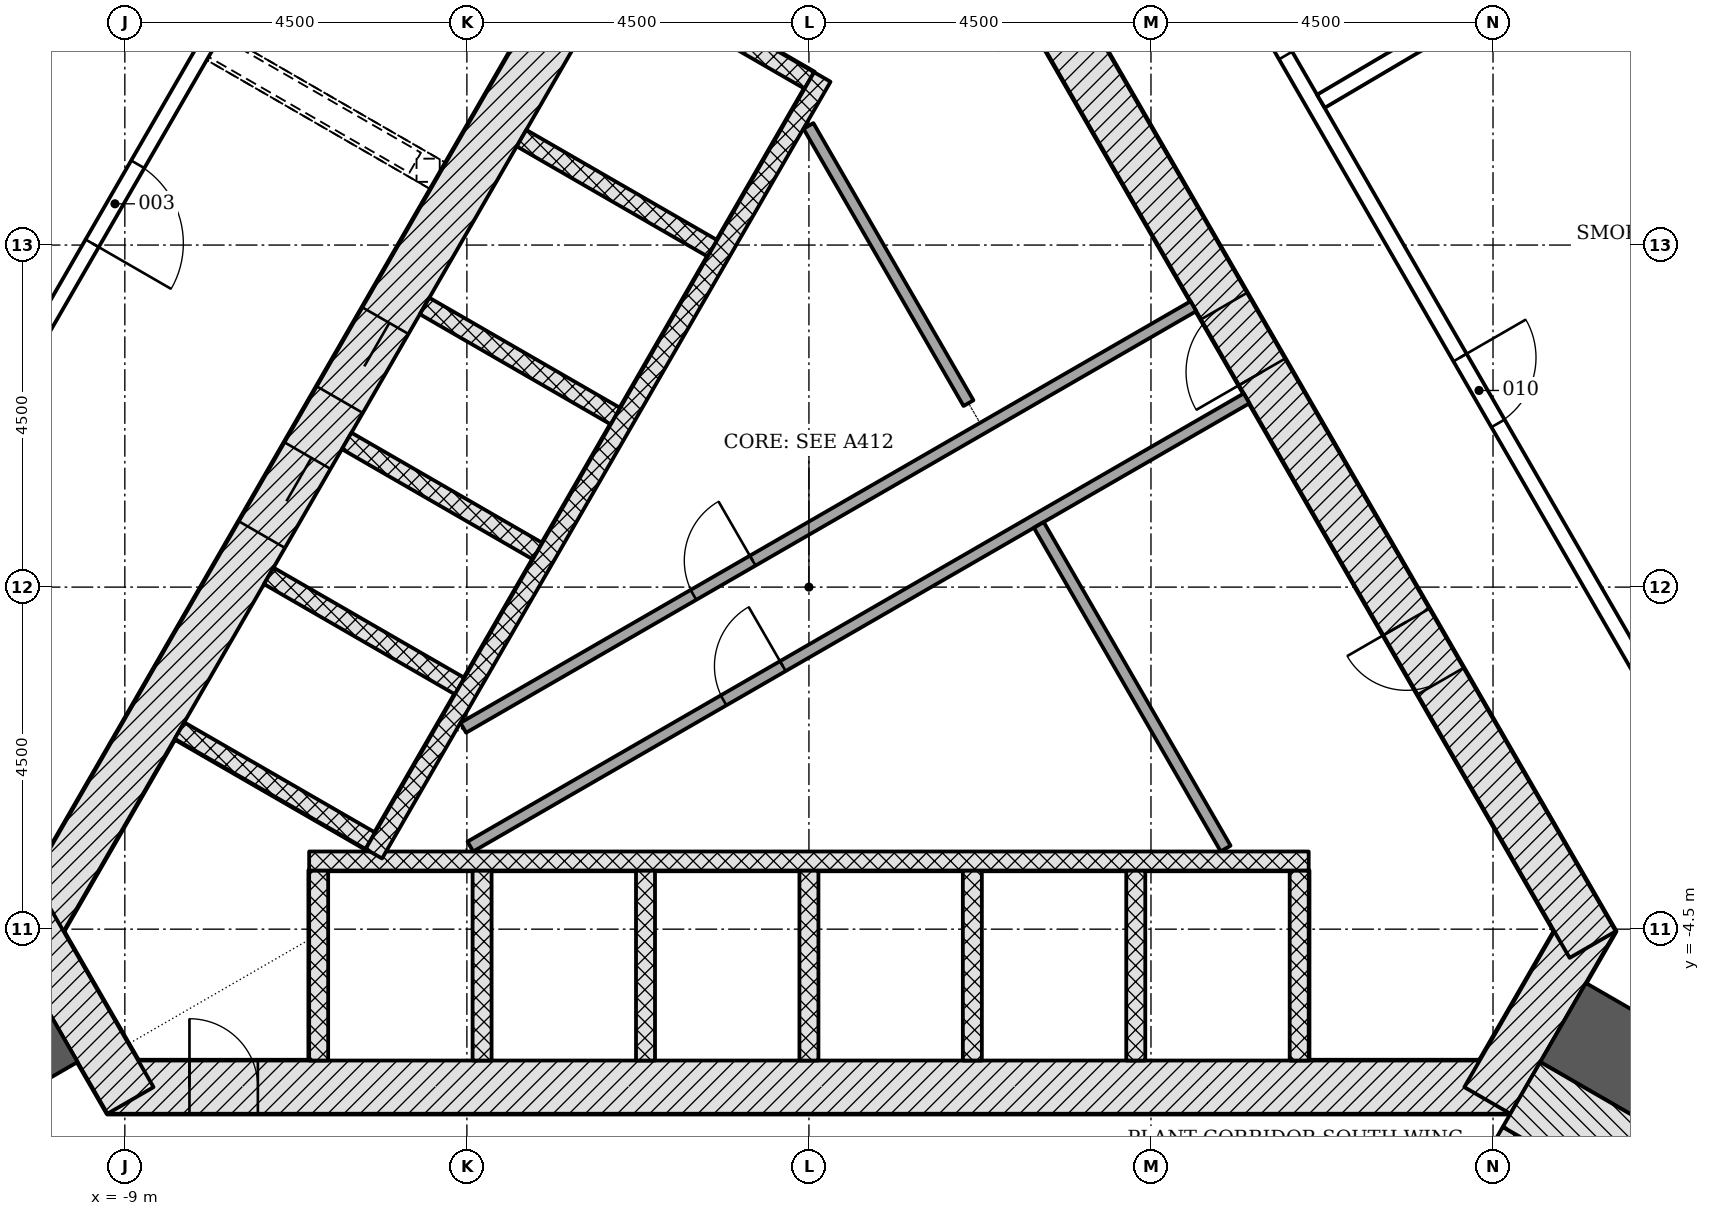
"""IFC4 building model, lengths in metres.
Left out: names, types, materials, properties, quantities, classifications, styles, units other than length and angle.
Written with IfcOpenShell. Run it as: python <this file> out.ifc"""

import sys

from ifc_helpers import new_model, si_unit, direction, frame, frame_2d, origin, place, context, subcontext, project, spatial, rectangle, extrude, element, fill, save


model = new_model("IFC4")
c1 = context("Model", 3, precision=1e-05, world=origin(), true_north=direction((0.0, 1.0)))
c2 = subcontext(c1, "Body", "Model", "MODEL_VIEW")
j1 = project(units=[si_unit("LENGTHUNIT", "METRE"), si_unit("PLANEANGLEUNIT", "RADIAN")], contexts=[c1])
p1 = place(None, origin())
s1 = spatial("IfcSite", under=j1, at=p1, CompositionType="ELEMENT")
p2 = place(p1, origin())
s2 = spatial("IfcBuilding", under=s1, at=p2, CompositionType="ELEMENT")
p3 = place(p2, frame((0.0, 0.0, 87.0)))
s3 = spatial("IfcBuildingStorey", under=s2, at=p3, CompositionType="ELEMENT", Elevation=87.0)
p4 = place(p3, frame((-9.229, -6.578, -0.3), z_axis=(0.0, 0.0, 1.0), x_axis=(1.0, 0.0, 0.0)))
e1 = element("IfcWall", 1, at=p4, inside=s3, PredefinedType="SHEAR", context=c2, shape_type="SweptSolid", body=[
    extrude(rectangle(XDim=18.458, YDim=0.7, at=frame_2d((9.229, 0.0))), origin(), (0.0, 0.0, 1.0), 4.6),
])
p5 = place(p4, frame((1.079, 0.0, 0.3)))
e2 = element("IfcOpeningElement", 2, at=p5, cuts=e1, PredefinedType="OPENING", context=c2, shape_type="SweptSolid", body=[
    extrude(rectangle(XDim=0.9, YDim=2.1, at=frame_2d((0.45, 1.05))), frame((0.0, 0.36, 0.0), z_axis=(0.0, -1.0, 0.0), x_axis=(1.0, 0.0, 0.0)), (0.0, 0.0, 1.0), 0.72),
])
p6 = place(p3, frame((8.926, -6.753, -0.3), z_axis=(0.0, 0.0, 1.0), x_axis=(0.500042739161, 0.866000726912, 0.0)))
e3 = element("IfcWall", 3, at=p6, inside=s3, PredefinedType="SHEAR", context=c2, shape_type="SweptSolid", body=[
    extrude(rectangle(XDim=2.771, YDim=0.7, at=frame_2d((1.386, 0.0))), origin(), (0.0, 0.0, 1.0), 4.6),
])
p7 = place(p3, frame((10.311, -4.703, -0.3), z_axis=(0.0, 0.0, 1.0), x_axis=(-0.500001446645, 0.866024568562, 0.0)))
e4 = element("IfcWall", 4, at=p7, inside=s3, PredefinedType="SHEAR", context=c2, shape_type="SweptSolid", body=[
    extrude(rectangle(XDim=18.458, YDim=0.7, at=frame_2d((9.229, 0.0))), origin(), (0.0, 0.0, 1.0), 4.6),
])
p8 = place(p7, frame((8.7, 0.0, 0.3)))
e5 = element("IfcOpeningElement", 5, at=p8, cuts=e4, PredefinedType="OPENING", context=c2, shape_type="SweptSolid", body=[
    extrude(rectangle(XDim=1.0, YDim=2.1, at=frame_2d((0.5, 1.05))), frame((0.0, 0.36, 0.0), z_axis=(0.0, -1.0, 0.0), x_axis=(1.0, 0.0, 0.0)), (0.0, 0.0, 1.0), 0.72),
])
p9 = place(p7, frame((4.002, 0.0, 0.3)))
e6 = element("IfcOpeningElement", 6, at=p9, cuts=e4, PredefinedType="OPENING", context=c2, shape_type="SweptSolid", body=[
    extrude(rectangle(XDim=0.9, YDim=2.1, at=frame_2d((0.45, 1.05))), frame((0.0, 0.36, 0.0), z_axis=(0.0, -1.0, 0.0), x_axis=(1.0, 0.0, 0.0)), (0.0, 0.0, 1.0), 0.72),
])
p10 = place(p7, frame((14.093, 0.0, 0.3)))
e7 = element("IfcOpeningElement", 7, at=p10, cuts=e4, PredefinedType="OPENING", context=c2, shape_type="SweptSolid", body=[
    extrude(rectangle(XDim=0.9, YDim=2.1, at=frame_2d((0.45, 1.05))), frame((0.0, 0.36, 0.0), z_axis=(0.0, -1.0, 0.0), x_axis=(1.0, 0.0, 0.0)), (0.0, 0.0, 1.0), 0.72),
])
p11 = place(p3, frame((-1.083, 11.281, -0.3), z_axis=(0.0, 0.0, 1.0), x_axis=(-0.500001446645, -0.866024568562, 0.0)))
e8 = element("IfcWall", 8, at=p11, inside=s3, PredefinedType="SHEAR", context=c2, shape_type="SweptSolid", body=[
    extrude(rectangle(XDim=18.458, YDim=0.7, at=frame_2d((9.229, 0.0))), origin(), (0.0, 0.0, 1.0), 4.6),
])
p12 = place(p11, frame((8.979, 0.0, 0.3)))
e9 = element("IfcOpeningElement", 9, at=p12, cuts=e8, PredefinedType="OPENING", context=c2, shape_type="SweptSolid", body=[
    extrude(rectangle(XDim=1.2, YDim=2.1, at=frame_2d((0.6, 1.05))), frame((0.0, 0.36, 0.0), z_axis=(0.0, -1.0, 0.0), x_axis=(1.0, 0.0, 0.0)), (0.0, 0.0, 1.0), 0.72),
])
p13 = place(p11, frame((11.029, 0.0, 0.3)))
e10 = element("IfcOpeningElement", 10, at=p13, cuts=e8, PredefinedType="OPENING", context=c2, shape_type="SweptSolid", body=[
    extrude(rectangle(XDim=1.2, YDim=2.1, at=frame_2d((0.6, 1.05))), frame((0.0, 0.36, 0.0), z_axis=(0.0, -1.0, 0.0), x_axis=(1.0, 0.0, 0.0)), (0.0, 0.0, 1.0), 0.72),
])
p14 = place(p3, frame((-10.311, -4.353, -0.3), z_axis=(0.0, 0.0, 1.0), x_axis=(0.500042739161, -0.866000726912, 0.0)))
e11 = element("IfcWall", 11, at=p14, inside=s3, PredefinedType="SHEAR", context=c2, shape_type="SweptSolid", body=[
    extrude(rectangle(XDim=2.771, YDim=0.7, at=frame_2d((1.386, 0.0))), origin(), (0.0, 0.0, 1.0), 4.6),
])
for number, where, z_axis, x_axis in (
    (12, (-9.922, -5.728, -0.3), (0.0, 0.0, 1.0), (-0.866, -0.5, 0.0)),
    (13, (9.922, -5.728, -0.3), (0.0, 0.0, 1.0), (0.866, -0.5, 0.0)),
):
    element("IfcWall", number, at=place(p3, frame(where, z_axis=z_axis, x_axis=x_axis)), inside=s3, PredefinedType="SHEAR", context=c2, shape_type="SweptSolid", body=[
        extrude(rectangle(XDim=12.677, YDim=1.2, at=frame_2d((6.339, 0.0))), origin(), (0.0, 0.0, 1.0), 4.6),
    ])
for number, where, z_axis, x_axis in (
    (14, (-6.45, -6.228, -0.3), (0.0, 0.0, 1.0), (0.0, 1.0, 0.0)),
    (15, (-4.3, -6.228, -0.3), (0.0, 0.0, 1.0), (0.0, 1.0, 0.0)),
    (16, (-2.15, -6.228, -0.3), (0.0, 0.0, 1.0), (0.0, 1.0, 0.0)),
    (17, (0.0, -6.228, -0.3), (0.0, 0.0, 1.0), (0.0, 1.0, 0.0)),
    (18, (2.15, -6.228, -0.3), (0.0, 0.0, 1.0), (0.0, 1.0, 0.0)),
    (19, (4.3, -6.228, -0.3), (0.0, 0.0, 1.0), (0.0, 1.0, 0.0)),
    (20, (6.45, -6.228, -0.3), (0.0, 0.0, 1.0), (0.0, 1.0, 0.0)),
):
    element("IfcWall", number, at=place(p3, frame(where, z_axis=z_axis, x_axis=x_axis)), inside=s3, PredefinedType="PARTITIONING", context=c2, shape_type="SweptSolid", body=[
        extrude(rectangle(XDim=2.5, YDim=0.25, at=frame_2d((1.25, 0.0))), origin(), (0.0, 0.0, 1.0), 4.6),
    ])
p15 = place(p3, frame((-6.575, -3.603, 0.0), z_axis=(0.0, 0.0, 1.0), x_axis=(1.0, 0.0, 0.0)))
e21 = element("IfcWall", 21, at=p15, inside=s3, PredefinedType="PARTITIONING", context=c2, shape_type="SweptSolid", body=[
    extrude(rectangle(XDim=13.15, YDim=0.25, at=frame_2d((6.575, 0.0))), origin(), (0.0, 0.0, 1.0), 4.3),
])
p16 = place(p3, frame((-2.506, 8.115, -0.3), z_axis=(0.0, 0.0, 1.0), x_axis=(0.865996321171, -0.50005036918, 0.0)))
e22 = element("IfcWall", 22, at=p16, inside=s3, PredefinedType="PARTITIONING", context=c2, shape_type="SweptSolid", body=[
    extrude(rectangle(XDim=2.9, YDim=0.25, at=frame_2d((1.45, 0.0))), origin(), (0.0, 0.0, 1.0), 4.6),
])
for number, where, z_axis, x_axis in (
    (23, (-3.781, 5.907, -0.3), (0.0, 0.0, 1.0), (0.866, -0.5, 0.0)),
    (24, (-5.056, 3.699, -0.3), (0.0, 0.0, 1.0), (0.866, -0.5, 0.0)),
    (25, (-6.081, 1.923, -0.3), (0.0, 0.0, 1.0), (0.866, -0.5, 0.0)),
    (26, (-7.106, 0.148, -0.3), (0.0, 0.0, 1.0), (0.866, -0.5, 0.0)),
    (27, (-8.281, -1.887, -0.3), (0.0, 0.0, 1.0), (0.866, -0.5, 0.0)),
):
    element("IfcWall", number, at=place(p3, frame(where, z_axis=z_axis, x_axis=x_axis)), inside=s3, PredefinedType="PARTITIONING", context=c2, shape_type="SweptSolid", body=[
        extrude(rectangle(XDim=2.9, YDim=0.25, at=frame_2d((1.45, 0.0))), origin(), (0.0, 0.0, 1.0), 4.6),
    ])
p17 = place(p3, frame((0.176, 6.711, 0.0), z_axis=(0.0, 0.0, 1.0), x_axis=(-0.500004227369, -0.866022963098, 0.0)))
e28 = element("IfcWall", 28, at=p17, inside=s3, PredefinedType="PARTITIONING", context=c2, shape_type="SweptSolid", body=[
    extrude(rectangle(XDim=11.8, YDim=0.25, at=frame_2d((5.9, 0.0))), origin(), (0.0, 0.0, 1.0), 4.3),
])
p18 = place(p3, frame((-4.548, -1.851, 0.0), z_axis=(0.0, 0.0, 1.0), x_axis=(0.866023939251, 0.500002536638, 0.0)))
e29 = element("IfcWall", 29, at=p18, inside=s3, PredefinedType="PARTITIONING", context=c2, shape_type="SweptSolid", body=[
    extrude(rectangle(XDim=11.092, YDim=0.15, at=frame_2d((5.546, 0.0))), origin(), (0.0, 0.0, 1.0), 4.3),
])
p19 = place(p18, frame((3.497, 0.0, 0.0)))
e30 = element("IfcOpeningElement", 30, at=p19, cuts=e29, PredefinedType="OPENING", context=c2, shape_type="SweptSolid", body=[
    extrude(rectangle(XDim=0.9, YDim=2.1, at=frame_2d((0.45, 1.05))), frame((0.0, 0.085, 0.0), z_axis=(0.0, -1.0, 0.0), x_axis=(1.0, 0.0, 0.0)), (0.0, 0.0, 1.0), 0.17),
])
p20 = place(p3, frame((2.099, 2.42, 0.0), z_axis=(0.0, 0.0, 1.0), x_axis=(-0.499998449073, 0.866026299211, 0.0)))
e31 = element("IfcWall", 31, at=p20, inside=s3, PredefinedType="PARTITIONING", context=c2, shape_type="SweptSolid", body=[
    extrude(rectangle(XDim=4.211, YDim=0.15, at=frame_2d((2.106, 0.0))), origin(), (0.0, 0.0, 1.0), 4.3),
])
p21 = place(p3, frame((-4.454, -3.413, 0.0), z_axis=(0.0, 0.0, 1.0), x_axis=(0.86603043987, 0.499991277142, 0.0)))
e32 = element("IfcWall", 32, at=p21, inside=s3, PredefinedType="PARTITIONING", context=c2, shape_type="SweptSolid", body=[
    extrude(rectangle(XDim=11.792, YDim=0.15, at=frame_2d((5.896, 0.0))), origin(), (0.0, 0.0, 1.0), 4.3),
])
p22 = place(p21, frame((3.847, 0.0, 0.0)))
e33 = element("IfcOpeningElement", 33, at=p22, cuts=e32, PredefinedType="OPENING", context=c2, shape_type="SweptSolid", body=[
    extrude(rectangle(XDim=0.9, YDim=2.1, at=frame_2d((0.45, 1.05))), frame((0.0, 0.085, 0.0), z_axis=(0.0, -1.0, 0.0), x_axis=(1.0, 0.0, 0.0)), (0.0, 0.0, 1.0), 0.17),
])
p23 = place(p3, frame((5.482, -3.439, 0.0), z_axis=(0.0, 0.0, 1.0), x_axis=(-0.500006183238, 0.866021833861, 0.0)))
e34 = element("IfcWall", 34, at=p23, inside=s3, PredefinedType="PARTITIONING", context=c2, shape_type="SweptSolid", body=[
    extrude(rectangle(XDim=4.916, YDim=0.15, at=frame_2d((2.458, 0.0))), origin(), (0.0, 0.0, 1.0), 4.3),
])
p24 = place(p3, frame((7.44, -10.226, -0.3), z_axis=(0.0, 0.0, 1.0), x_axis=(0.500022077904, 0.866012656725, 0.0)))
e35 = element("IfcWall", 35, at=p24, inside=s3, PredefinedType="SHEAR", context=c2, shape_type="SweptSolid", body=[
    extrude(rectangle(XDim=3.55, YDim=0.2, at=frame_2d((1.775, 0.0))), origin(), (0.0, 0.0, 1.0), 4.6),
])
p25 = place(p24, frame((1.175, 0.0, 0.3)))
e36 = element("IfcOpeningElement", 36, at=p25, cuts=e35, PredefinedType="OPENING", context=c2, shape_type="SweptSolid", body=[
    extrude(rectangle(XDim=1.2, YDim=2.1, at=frame_2d((0.6, 1.05))), frame((0.0, 0.11, 0.0), z_axis=(0.0, -1.0, 0.0), x_axis=(1.0, 0.0, 0.0)), (0.0, 0.0, 1.0), 0.22),
])
p26 = place(p3, frame((9.375, -6.675, -0.3), z_axis=(0.0, 0.0, 1.0), x_axis=(0.866026919366, -0.499997374926, 0.0)))
e37 = element("IfcWall", 37, at=p26, inside=s3, PredefinedType="SHEAR", context=c2, shape_type="SweptSolid", body=[
    extrude(rectangle(XDim=7.2, YDim=0.986, at=frame_2d((3.6, 0.0))), origin(), (0.0, 0.0, 1.0), 4.6),
])
p27 = place(p3, frame((-0.687, 19.667, 0.0), z_axis=(0.0, 0.0, 1.0), x_axis=(-0.500000491645, -0.866025119933, 0.0)))
e38 = element("IfcWall", 38, at=p27, inside=s3, PredefinedType="PARTITIONING", context=c2, shape_type="SweptSolid", body=[
    extrude(rectangle(XDim=23.943, YDim=0.2, at=frame_2d((11.971, 0.0))), origin(), (0.0, 0.0, 1.0), 3.678),
])
p28 = place(p27, frame((16.287, 0.0, 0.0)))
e39 = element("IfcOpeningElement", 39, at=p28, cuts=e38, PredefinedType="OPENING", context=c2, shape_type="SweptSolid", body=[
    extrude(rectangle(XDim=1.2, YDim=2.1, at=frame_2d((0.6, 1.05))), frame((0.0, 0.11, 0.0), z_axis=(0.0, -1.0, 0.0), x_axis=(1.0, 0.0, 0.0)), (0.0, 0.0, 1.0), 0.22),
])
p29 = place(p3, frame((-16.45, -3.237, 0.0), z_axis=(0.0, 0.0, 1.0), x_axis=(0.499997734893, 0.866026711541, 0.0)))
e40 = element("IfcWall", 40, at=p29, inside=s3, PredefinedType="PARTITIONING", context=c2, shape_type="SweptSolid", body=[
    extrude(rectangle(XDim=31.527, YDim=0.2, at=frame_2d((15.764, 0.0))), origin(), (0.0, 0.0, 1.0), 3.678),
])
p30 = place(p29, frame((19.615, 0.0, 0.0)))
e41 = element("IfcOpeningElement", 41, at=p30, cuts=e40, PredefinedType="OPENING", context=c2, shape_type="SweptSolid", body=[
    extrude(rectangle(XDim=1.0, YDim=2.1, at=frame_2d((0.5, 1.05))), frame((0.0, 0.11, 0.0), z_axis=(0.0, -1.0, 0.0), x_axis=(1.0, 0.0, 0.0)), (0.0, 0.0, 1.0), 0.22),
])
p31 = place(p29, frame((1.828, 0.0, 0.0)))
e42 = element("IfcOpeningElement", 42, at=p31, cuts=e40, PredefinedType="OPENING", context=c2, shape_type="SweptSolid", body=[
    extrude(rectangle(XDim=1.0, YDim=2.1, at=frame_2d((0.5, 1.05))), frame((0.0, 0.11, 0.0), z_axis=(0.0, -1.0, 0.0), x_axis=(1.0, 0.0, 0.0)), (0.0, 0.0, 1.0), 0.22),
])
p32 = place(p3, frame((5.282, 8.708, 0.0), z_axis=(0.0, 0.0, 1.0), x_axis=(0.500007704848, -0.866020955343, 0.0)))
e43 = element("IfcWall", 43, at=p32, inside=s3, PredefinedType="PARTITIONING", context=c2, shape_type="SweptSolid", body=[
    extrude(rectangle(XDim=18.991, YDim=0.2, at=frame_2d((9.496, 0.0))), origin(), (0.0, 0.0, 1.0), 3.678),
])
p33 = place(p32, frame((14.783, 0.0, 0.0)))
e44 = element("IfcOpeningElement", 44, at=p33, cuts=e43, PredefinedType="OPENING", context=c2, shape_type="SweptSolid", body=[
    extrude(rectangle(XDim=1.0, YDim=2.1, at=frame_2d((0.5, 1.05))), frame((0.0, 0.11, 0.0), z_axis=(0.0, -1.0, 0.0), x_axis=(1.0, 0.0, 0.0)), (0.0, 0.0, 1.0), 0.22),
])
p34 = place(p32, frame((6.567, 0.0, 0.0)))
e45 = element("IfcOpeningElement", 45, at=p34, cuts=e43, PredefinedType="OPENING", context=c2, shape_type="SweptSolid", body=[
    extrude(rectangle(XDim=1.0, YDim=2.1, at=frame_2d((0.5, 1.05))), frame((0.0, 0.11, 0.0), z_axis=(0.0, -1.0, 0.0), x_axis=(1.0, 0.0, 0.0)), (0.0, 0.0, 1.0), 0.22),
])
p35 = place(p32, frame((0.979, 0.0, 0.0)))
e46 = element("IfcOpeningElement", 46, at=p35, cuts=e43, PredefinedType="OPENING", context=c2, shape_type="SweptSolid", body=[
    extrude(rectangle(XDim=1.0, YDim=2.1, at=frame_2d((0.5, 1.05))), frame((0.0, 0.11, 0.0), z_axis=(0.0, -1.0, 0.0), x_axis=(1.0, 0.0, 0.0)), (0.0, 0.0, 1.0), 0.22),
])
p36 = place(p3, frame((6.736, 6.392, 0.0), z_axis=(0.0, 0.0, 1.0), x_axis=(0.861056110095, 0.508509955919, 0.0)))
e47 = element("IfcWall", 47, at=p36, inside=s3, PredefinedType="PARTITIONING", context=c2, shape_type="SweptSolid", body=[
    extrude(rectangle(XDim=7.688, YDim=0.2, at=frame_2d((3.844, 0.0))), origin(), (0.0, 0.0, 1.0), 3.678),
])
p37 = place(p12, origin())
e48 = element("IfcDoor", 48, at=p37, inside=s3, OperationType="DOUBLE_DOOR_SLIDING", PredefinedType="DOOR", context=c2, shape_type="SweptSolid", body=[
    extrude(rectangle(XDim=1.2, YDim=2.1, at=frame_2d((0.6, 1.05))), frame((0.0, 0.025, 0.0), z_axis=(0.0, -1.0, 0.0), x_axis=(1.0, 0.0, 0.0)), (0.0, 0.0, 1.0), 0.05),
])
fill(e9, e48)
p38 = place(p13, origin())
e49 = element("IfcDoor", 49, at=p38, inside=s3, OperationType="DOUBLE_DOOR_SLIDING", PredefinedType="DOOR", context=c2, shape_type="SweptSolid", body=[
    extrude(rectangle(XDim=1.2, YDim=2.1, at=frame_2d((0.6, 1.05))), frame((0.0, 0.025, 0.0), z_axis=(0.0, -1.0, 0.0), x_axis=(1.0, 0.0, 0.0)), (0.0, 0.0, 1.0), 0.05),
])
fill(e10, e49)
p39 = place(p8, origin())
e50 = element("IfcDoor", 50, at=p39, inside=s3, OperationType="SINGLE_SWING_LEFT", PredefinedType="DOOR", context=c2, shape_type="SweptSolid", body=[
    extrude(rectangle(XDim=1.0, YDim=2.1, at=frame_2d((0.5, 1.05))), frame((0.0, 0.075, 0.0), z_axis=(0.0, -1.0, 0.0), x_axis=(1.0, 0.0, 0.0)), (0.0, 0.0, 1.0), 0.15),
])
fill(e5, e50)
p40 = place(p9, origin())
e51 = element("IfcDoor", 51, at=p40, inside=s3, OperationType="SINGLE_SWING_RIGHT", PredefinedType="DOOR", context=c2, shape_type="SweptSolid", body=[
    extrude(rectangle(XDim=0.9, YDim=2.1, at=frame_2d((0.45, 1.05))), frame((0.0, 0.075, 0.0), z_axis=(0.0, -1.0, 0.0), x_axis=(1.0, 0.0, 0.0)), (0.0, 0.0, 1.0), 0.15),
])
fill(e6, e51)
p41 = place(p22, origin())
e52 = element("IfcDoor", 52, at=p41, inside=s3, OperationType="SINGLE_SWING_RIGHT", PredefinedType="DOOR", context=c2, shape_type="SweptSolid", body=[
    extrude(rectangle(XDim=0.9, YDim=2.1, at=frame_2d((0.45, 1.05))), frame((0.0, 0.025, 0.0), z_axis=(0.0, -1.0, 0.0), x_axis=(1.0, 0.0, 0.0)), (0.0, 0.0, 1.0), 0.05),
])
fill(e33, e52)
p42 = place(p5, origin())
e53 = element("IfcDoor", 53, at=p42, inside=s3, OperationType="SINGLE_SWING_LEFT", PredefinedType="DOOR", context=c2, shape_type="SweptSolid", body=[
    extrude(rectangle(XDim=0.9, YDim=2.1, at=frame_2d((0.45, 1.05))), frame((0.0, 0.075, 0.0), z_axis=(0.0, -1.0, 0.0), x_axis=(1.0, 0.0, 0.0)), (0.0, 0.0, 1.0), 0.15),
])
fill(e2, e53)
p43 = place(p19, origin())
e54 = element("IfcDoor", 54, at=p43, inside=s3, OperationType="SINGLE_SWING_RIGHT", PredefinedType="DOOR", context=c2, shape_type="SweptSolid", body=[
    extrude(rectangle(XDim=0.9, YDim=2.1, at=frame_2d((0.45, 1.05))), frame((0.0, 0.025, 0.0), z_axis=(0.0, -1.0, 0.0), x_axis=(1.0, 0.0, 0.0)), (0.0, 0.0, 1.0), 0.05),
])
fill(e30, e54)
p44 = place(p28, origin())
e55 = element("IfcDoor", 55, at=p44, inside=s3, OperationType="SINGLE_SWING_RIGHT", PredefinedType="DOOR", context=c2, shape_type="SweptSolid", body=[
    extrude(rectangle(XDim=1.2, YDim=2.1, at=frame_2d((0.6, 1.05))), frame((0.0, 0.025, 0.0), z_axis=(0.0, -1.0, 0.0), x_axis=(1.0, 0.0, 0.0)), (0.0, 0.0, 1.0), 0.05),
])
fill(e39, e55)
p45 = place(p34, origin())
e56 = element("IfcDoor", 56, at=p45, inside=s3, OperationType="SINGLE_SWING_LEFT", PredefinedType="DOOR", context=c2, shape_type="SweptSolid", body=[
    extrude(rectangle(XDim=1.0, YDim=2.1, at=frame_2d((0.5, 1.05))), frame((0.0, 0.025, 0.0), z_axis=(0.0, -1.0, 0.0), x_axis=(1.0, 0.0, 0.0)), (0.0, 0.0, 1.0), 0.05),
])
fill(e45, e56)
p46 = place(p35, origin())
e57 = element("IfcDoor", 57, at=p46, inside=s3, OperationType="SINGLE_SWING_LEFT", PredefinedType="DOOR", context=c2, shape_type="SweptSolid", body=[
    extrude(rectangle(XDim=1.0, YDim=2.1, at=frame_2d((0.5, 1.05))), frame((0.0, 0.025, 0.0), z_axis=(0.0, -1.0, 0.0), x_axis=(1.0, 0.0, 0.0)), (0.0, 0.0, 1.0), 0.05),
])
fill(e46, e57)
save(model, sys.argv[1])
